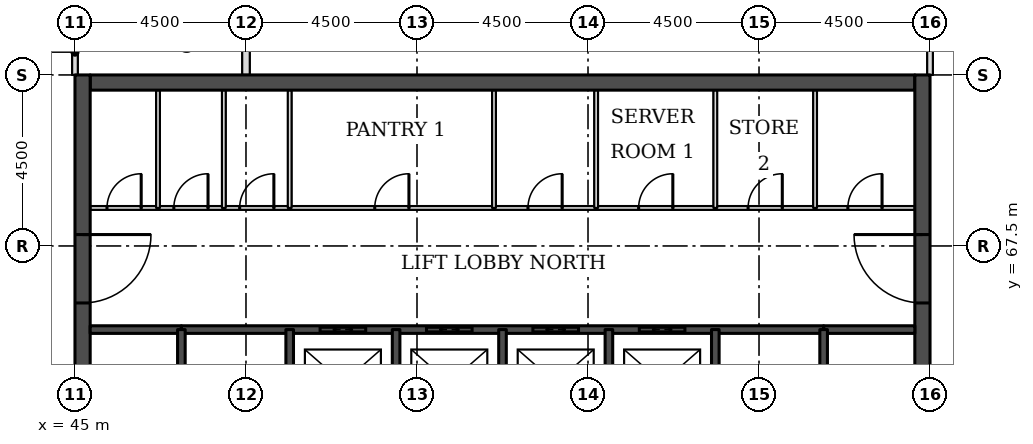
"""IFC4 building model, lengths in metres.
Left out: names, types, materials, properties, quantities, classifications, styles, units other than length and angle.
Written with IfcOpenShell. Run it as: python <this file> out.ifc"""

import sys

from ifc_helpers import new_model, si_unit, direction, frame, frame_2d, origin, place, context, subcontext, project, spatial, rectangle, extrude, element, fill, save


model = new_model("IFC4")
c1 = context("Model", 3, precision=1e-05, world=origin(), true_north=direction((0.0, 1.0)))
c2 = subcontext(c1, "Body", "Model", "MODEL_VIEW")
j1 = project(units=[si_unit("LENGTHUNIT", "METRE"), si_unit("PLANEANGLEUNIT", "RADIAN")], contexts=[c1])
p1 = place(None, origin())
s1 = spatial("IfcSite", under=j1, at=p1, CompositionType="ELEMENT")
p2 = place(p1, origin())
s2 = spatial("IfcBuilding", under=s1, at=p2, CompositionType="ELEMENT")
p3 = place(p2, frame((0.0, 0.0, 181.0)))
s3 = spatial("IfcBuildingStorey", under=s2, at=p3, CompositionType="ELEMENT", Elevation=181.0)
p4 = place(p3, frame((45.4, 71.8, 0.0), z_axis=(0.0, 0.0, 1.0), x_axis=(1.0, 0.0, 0.0)))
e1 = element("IfcWall", 1, at=p4, inside=s3, PredefinedType="SHEAR", context=c2, shape_type="SweptSolid", body=[
    extrude(rectangle(XDim=21.7, YDim=0.4, at=frame_2d((10.85, 0.0))), origin(), (0.0, 0.0, 1.0), 3.7),
])
p5 = place(p3, frame((45.2, 49.5, 0.0), z_axis=(0.0, 0.0, 1.0), x_axis=(0.0, 1.0, 0.0)))
e2 = element("IfcWall", 2, at=p5, inside=s3, PredefinedType="SHEAR", context=c2, shape_type="SweptSolid", body=[
    extrude(rectangle(XDim=22.5, YDim=0.4, at=frame_2d((11.25, 0.0))), origin(), (0.0, 0.0, 1.0), 3.7),
])
p6 = place(p5, frame((4.2, 0.0, 0.0)))
e3 = element("IfcOpeningElement", 3, at=p6, cuts=e2, PredefinedType="OPENING", context=c2, shape_type="SweptSolid", body=[
    extrude(rectangle(XDim=1.8, YDim=2.1, at=frame_2d((0.9, 1.05))), frame((0.0, 0.21, 0.0), z_axis=(0.0, -1.0, 0.0), x_axis=(1.0, 0.0, 0.0)), (0.0, 0.0, 1.0), 0.42),
])
p7 = place(p5, frame((6.9, 0.0, 0.0)))
e4 = element("IfcOpeningElement", 4, at=p7, cuts=e2, PredefinedType="OPENING", context=c2, shape_type="SweptSolid", body=[
    extrude(rectangle(XDim=1.1, YDim=2.1, at=frame_2d((0.55, 1.05))), frame((0.0, 0.21, 0.0), z_axis=(0.0, -1.0, 0.0), x_axis=(1.0, 0.0, 0.0)), (0.0, 0.0, 1.0), 0.42),
])
p8 = place(p5, frame((13.6, 0.0, 0.0)))
e5 = element("IfcOpeningElement", 5, at=p8, cuts=e2, PredefinedType="OPENING", context=c2, shape_type="SweptSolid", body=[
    extrude(rectangle(XDim=1.1, YDim=2.1, at=frame_2d((0.55, 1.05))), frame((0.0, 0.21, 0.0), z_axis=(0.0, -1.0, 0.0), x_axis=(1.0, 0.0, 0.0)), (0.0, 0.0, 1.0), 0.42),
])
p9 = place(p5, frame((16.5, 0.0, 0.0)))
e6 = element("IfcOpeningElement", 6, at=p9, cuts=e2, PredefinedType="OPENING", context=c2, shape_type="SweptSolid", body=[
    extrude(rectangle(XDim=1.8, YDim=2.1, at=frame_2d((0.9, 1.05))), frame((0.0, 0.21, 0.0), z_axis=(0.0, -1.0, 0.0), x_axis=(1.0, 0.0, 0.0)), (0.0, 0.0, 1.0), 0.42),
])
p10 = place(p3, frame((67.3, 49.5, 0.0), z_axis=(0.0, 0.0, 1.0), x_axis=(0.0, 1.0, 0.0)))
e7 = element("IfcWall", 7, at=p10, inside=s3, PredefinedType="SHEAR", context=c2, shape_type="SweptSolid", body=[
    extrude(rectangle(XDim=22.5, YDim=0.4, at=frame_2d((11.25, 0.0))), origin(), (0.0, 0.0, 1.0), 3.7),
])
p11 = place(p10, frame((4.2, 0.0, 0.0)))
e8 = element("IfcOpeningElement", 8, at=p11, cuts=e7, PredefinedType="OPENING", context=c2, shape_type="SweptSolid", body=[
    extrude(rectangle(XDim=1.8, YDim=2.1, at=frame_2d((0.9, 1.05))), frame((0.0, 0.21, 0.0), z_axis=(0.0, -1.0, 0.0), x_axis=(1.0, 0.0, 0.0)), (0.0, 0.0, 1.0), 0.42),
])
p12 = place(p10, frame((6.9, 0.0, 0.0)))
e9 = element("IfcOpeningElement", 9, at=p12, cuts=e7, PredefinedType="OPENING", context=c2, shape_type="SweptSolid", body=[
    extrude(rectangle(XDim=1.1, YDim=2.1, at=frame_2d((0.55, 1.05))), frame((0.0, 0.21, 0.0), z_axis=(0.0, -1.0, 0.0), x_axis=(1.0, 0.0, 0.0)), (0.0, 0.0, 1.0), 0.42),
])
p13 = place(p10, frame((13.6, 0.0, 0.0)))
e10 = element("IfcOpeningElement", 10, at=p13, cuts=e7, PredefinedType="OPENING", context=c2, shape_type="SweptSolid", body=[
    extrude(rectangle(XDim=1.1, YDim=2.1, at=frame_2d((0.55, 1.05))), frame((0.0, 0.21, 0.0), z_axis=(0.0, -1.0, 0.0), x_axis=(1.0, 0.0, 0.0)), (0.0, 0.0, 1.0), 0.42),
])
p14 = place(p10, frame((16.5, 0.0, 0.0)))
e11 = element("IfcOpeningElement", 11, at=p14, cuts=e7, PredefinedType="OPENING", context=c2, shape_type="SweptSolid", body=[
    extrude(rectangle(XDim=1.8, YDim=2.1, at=frame_2d((0.9, 1.05))), frame((0.0, 0.21, 0.0), z_axis=(0.0, -1.0, 0.0), x_axis=(1.0, 0.0, 0.0)), (0.0, 0.0, 1.0), 0.42),
])
p15 = place(p3, frame((45.0, 72.0, 0.0), z_axis=(0.0, 0.0, 1.0), x_axis=(0.0, 1.0, 0.0)))
e12 = element("IfcWall", 12, at=p15, inside=s3, PredefinedType="PARTITIONING", context=c2, shape_type="SweptSolid", body=[
    extrude(rectangle(XDim=6.0, YDim=0.15, at=frame_2d((3.0, 0.0))), origin(), (0.0, 0.0, 1.0), 3.022),
])
p16 = place(p15, frame((2.5, 0.0, 0.0)))
e13 = element("IfcOpeningElement", 13, at=p16, cuts=e12, PredefinedType="OPENING", context=c2, shape_type="SweptSolid", body=[
    extrude(rectangle(XDim=1.0, YDim=2.1, at=frame_2d((0.5, 1.05))), frame((0.0, 0.085, 0.0), z_axis=(0.0, -1.0, 0.0), x_axis=(1.0, 0.0, 0.0)), (0.0, 0.0, 1.0), 0.17),
])
p17 = place(p3, frame((49.5, 72.0, 0.0), z_axis=(0.0, 0.0, 1.0), x_axis=(0.0, 1.0, 0.0)))
e14 = element("IfcWall", 14, at=p17, inside=s3, PredefinedType="PARTITIONING", context=c2, shape_type="SweptSolid", body=[
    extrude(rectangle(XDim=3.0, YDim=0.2, at=frame_2d((1.5, 0.0))), origin(), (0.0, 0.0, 1.0), 3.55),
])
p18 = place(p3, frame((67.5, 72.0, 0.0), z_axis=(0.0, 0.0, 1.0), x_axis=(0.0, 1.0, 0.0)))
e15 = element("IfcWall", 15, at=p18, inside=s3, PredefinedType="PARTITIONING", context=c2, shape_type="SweptSolid", body=[
    extrude(rectangle(XDim=3.0, YDim=0.15, at=frame_2d((1.5, 0.0))), origin(), (0.0, 0.0, 1.0), 3.022),
])
p19 = place(p18, frame((1.0, 0.0, 0.0)))
e16 = element("IfcOpeningElement", 16, at=p19, cuts=e15, PredefinedType="OPENING", context=c2, shape_type="SweptSolid", body=[
    extrude(rectangle(XDim=1.0, YDim=2.1, at=frame_2d((0.5, 1.05))), frame((0.0, 0.085, 0.0), z_axis=(0.0, -1.0, 0.0), x_axis=(1.0, 0.0, 0.0)), (0.0, 0.0, 1.0), 0.17),
])
for number, where, z_axis, x_axis in (
    (17, (45.4, 65.3, 0.0), (0.0, 0.0, 1.0), (1.0, 0.0, 0.0)),
    (18, (64.7, 65.3, 0.0), (0.0, 0.0, 1.0), (1.0, 0.0, 0.0)),
):
    element("IfcWall", number, at=place(p3, frame(where, z_axis=z_axis, x_axis=x_axis)), inside=s3, PredefinedType="SOLIDWALL", context=c2, shape_type="SweptSolid", body=[
        extrude(rectangle(XDim=2.4, YDim=0.2, at=frame_2d((1.2, 0.0))), origin(), (0.0, 0.0, 1.0), 3.55),
    ])
p20 = place(p3, frame((47.8, 65.3, 0.0), z_axis=(0.0, 0.0, 1.0), x_axis=(1.0, 0.0, 0.0)))
e19 = element("IfcWall", 19, at=p20, inside=s3, PredefinedType="SOLIDWALL", context=c2, shape_type="SweptSolid", body=[
    extrude(rectangle(XDim=16.9, YDim=0.2, at=frame_2d((8.45, 0.0))), origin(), (0.0, 0.0, 1.0), 3.55),
])
p21 = place(p20, frame((3.65, 0.0, 0.0)))
e20 = element("IfcOpeningElement", 20, at=p21, cuts=e19, PredefinedType="OPENING", context=c2, shape_type="SweptSolid", body=[
    extrude(rectangle(XDim=1.2, YDim=2.1, at=frame_2d((0.6, 1.05))), frame((0.0, 0.11, 0.0), z_axis=(0.0, -1.0, 0.0), x_axis=(1.0, 0.0, 0.0)), (0.0, 0.0, 1.0), 0.22),
])
p22 = place(p20, frame((6.45, 0.0, 0.0)))
e21 = element("IfcOpeningElement", 21, at=p22, cuts=e19, PredefinedType="OPENING", context=c2, shape_type="SweptSolid", body=[
    extrude(rectangle(XDim=1.2, YDim=2.1, at=frame_2d((0.6, 1.05))), frame((0.0, 0.11, 0.0), z_axis=(0.0, -1.0, 0.0), x_axis=(1.0, 0.0, 0.0)), (0.0, 0.0, 1.0), 0.22),
])
p23 = place(p20, frame((9.25, 0.0, 0.0)))
e22 = element("IfcOpeningElement", 22, at=p23, cuts=e19, PredefinedType="OPENING", context=c2, shape_type="SweptSolid", body=[
    extrude(rectangle(XDim=1.2, YDim=2.1, at=frame_2d((0.6, 1.05))), frame((0.0, 0.11, 0.0), z_axis=(0.0, -1.0, 0.0), x_axis=(1.0, 0.0, 0.0)), (0.0, 0.0, 1.0), 0.22),
])
p24 = place(p20, frame((12.05, 0.0, 0.0)))
e23 = element("IfcOpeningElement", 23, at=p24, cuts=e19, PredefinedType="OPENING", context=c2, shape_type="SweptSolid", body=[
    extrude(rectangle(XDim=1.2, YDim=2.1, at=frame_2d((0.6, 1.05))), frame((0.0, 0.11, 0.0), z_axis=(0.0, -1.0, 0.0), x_axis=(1.0, 0.0, 0.0)), (0.0, 0.0, 1.0), 0.22),
])
p25 = place(p3, frame((45.4, 68.5, 0.0), z_axis=(0.0, 0.0, 1.0), x_axis=(1.0, 0.0, 0.0)))
e24 = element("IfcWall", 24, at=p25, inside=s3, PredefinedType="PARTITIONING", context=c2, shape_type="SweptSolid", body=[
    extrude(rectangle(XDim=21.7, YDim=0.1, at=frame_2d((10.85, 0.0))), origin(), (0.0, 0.0, 1.0), 3.55),
])
p26 = place(p25, frame((19.938, 0.0, 0.0)))
e25 = element("IfcOpeningElement", 25, at=p26, cuts=e24, PredefinedType="OPENING", context=c2, shape_type="SweptSolid", body=[
    extrude(rectangle(XDim=0.9, YDim=2.1, at=frame_2d((0.45, 1.05))), frame((0.0, 0.06, 0.0), z_axis=(0.0, -1.0, 0.0), x_axis=(1.0, 0.0, 0.0)), (0.0, 0.0, 1.0), 0.12),
])
p27 = place(p25, frame((17.312, 0.0, 0.0)))
e26 = element("IfcOpeningElement", 26, at=p27, cuts=e24, PredefinedType="OPENING", context=c2, shape_type="SweptSolid", body=[
    extrude(rectangle(XDim=0.9, YDim=2.1, at=frame_2d((0.45, 1.05))), frame((0.0, 0.06, 0.0), z_axis=(0.0, -1.0, 0.0), x_axis=(1.0, 0.0, 0.0)), (0.0, 0.0, 1.0), 0.12),
])
p28 = place(p25, frame((0.442, 0.0, 0.0)))
e27 = element("IfcOpeningElement", 27, at=p28, cuts=e24, PredefinedType="OPENING", context=c2, shape_type="SweptSolid", body=[
    extrude(rectangle(XDim=0.9, YDim=2.1, at=frame_2d((0.45, 1.05))), frame((0.0, 0.06, 0.0), z_axis=(0.0, -1.0, 0.0), x_axis=(1.0, 0.0, 0.0)), (0.0, 0.0, 1.0), 0.12),
])
p29 = place(p25, frame((2.201, 0.0, 0.0)))
e28 = element("IfcOpeningElement", 28, at=p29, cuts=e24, PredefinedType="OPENING", context=c2, shape_type="SweptSolid", body=[
    extrude(rectangle(XDim=0.9, YDim=2.1, at=frame_2d((0.45, 1.05))), frame((0.0, 0.06, 0.0), z_axis=(0.0, -1.0, 0.0), x_axis=(1.0, 0.0, 0.0)), (0.0, 0.0, 1.0), 0.12),
])
p30 = place(p25, frame((3.934, 0.0, 0.0)))
e29 = element("IfcOpeningElement", 29, at=p30, cuts=e24, PredefinedType="OPENING", context=c2, shape_type="SweptSolid", body=[
    extrude(rectangle(XDim=0.9, YDim=2.1, at=frame_2d((0.45, 1.05))), frame((0.0, 0.06, 0.0), z_axis=(0.0, -1.0, 0.0), x_axis=(1.0, 0.0, 0.0)), (0.0, 0.0, 1.0), 0.12),
])
p31 = place(p25, frame((14.432, 0.0, 0.0)))
e30 = element("IfcOpeningElement", 30, at=p31, cuts=e24, PredefinedType="OPENING", context=c2, shape_type="SweptSolid", body=[
    extrude(rectangle(XDim=0.9, YDim=2.1, at=frame_2d((0.45, 1.05))), frame((0.0, 0.06, 0.0), z_axis=(0.0, -1.0, 0.0), x_axis=(1.0, 0.0, 0.0)), (0.0, 0.0, 1.0), 0.12),
])
p32 = place(p25, frame((11.52, 0.0, 0.0)))
e31 = element("IfcOpeningElement", 31, at=p32, cuts=e24, PredefinedType="OPENING", context=c2, shape_type="SweptSolid", body=[
    extrude(rectangle(XDim=0.9, YDim=2.1, at=frame_2d((0.45, 1.05))), frame((0.0, 0.06, 0.0), z_axis=(0.0, -1.0, 0.0), x_axis=(1.0, 0.0, 0.0)), (0.0, 0.0, 1.0), 0.12),
])
p33 = place(p25, frame((7.488, 0.0, 0.0)))
e32 = element("IfcOpeningElement", 32, at=p33, cuts=e24, PredefinedType="OPENING", context=c2, shape_type="SweptSolid", body=[
    extrude(rectangle(XDim=0.9, YDim=2.1, at=frame_2d((0.45, 1.05))), frame((0.0, 0.06, 0.0), z_axis=(0.0, -1.0, 0.0), x_axis=(1.0, 0.0, 0.0)), (0.0, 0.0, 1.0), 0.12),
])
p34 = place(p3, frame((47.185, 68.5, 0.0), z_axis=(0.0, 0.0, 1.0), x_axis=(0.0, 1.0, 0.0)))
e33 = element("IfcWall", 33, at=p34, inside=s3, PredefinedType="PARTITIONING", context=c2, shape_type="SweptSolid", body=[
    extrude(rectangle(XDim=3.1, YDim=0.1, at=frame_2d((1.55, 0.0))), origin(), (0.0, 0.0, 1.0), 3.55),
])
p35 = place(p3, frame((47.8, 62.0, 0.0), z_axis=(0.0, 0.0, 1.0), x_axis=(0.0, 1.0, 0.0)))
e34 = element("IfcWall", 34, at=p35, inside=s3, PredefinedType="SOLIDWALL", context=c2, shape_type="SweptSolid", body=[
    extrude(rectangle(XDim=3.3, YDim=0.2, at=frame_2d((1.65, 0.0))), origin(), (0.0, 0.0, 1.0), 3.55),
])
p36 = place(p35, frame((1.1, 0.0, 0.0)))
e35 = element("IfcOpeningElement", 35, at=p36, cuts=e34, PredefinedType="OPENING", context=c2, shape_type="SweptSolid", body=[
    extrude(rectangle(XDim=1.1, YDim=2.1, at=frame_2d((0.55, 1.05))), frame((0.0, 0.11, 0.0), z_axis=(0.0, -1.0, 0.0), x_axis=(1.0, 0.0, 0.0)), (0.0, 0.0, 1.0), 0.22),
])
for number, where, z_axis, x_axis in (
    (36, (48.917, 68.5, 0.0), (0.0, 0.0, 1.0), (0.0, 1.0, 0.0)),
    (37, (50.65, 68.5, 0.0), (0.0, 0.0, 1.0), (0.0, 1.0, 0.0)),
):
    element("IfcWall", number, at=place(p3, frame(where, z_axis=z_axis, x_axis=x_axis)), inside=s3, PredefinedType="PARTITIONING", context=c2, shape_type="SweptSolid", body=[
        extrude(rectangle(XDim=3.1, YDim=0.1, at=frame_2d((1.55, 0.0))), origin(), (0.0, 0.0, 1.0), 3.55),
    ])
p37 = place(p3, frame((50.65, 62.0, 0.0), z_axis=(0.0, 0.0, 1.0), x_axis=(0.0, 1.0, 0.0)))
e38 = element("IfcWall", 38, at=p37, inside=s3, PredefinedType="SOLIDWALL", context=c2, shape_type="SweptSolid", body=[
    extrude(rectangle(XDim=3.3, YDim=0.2, at=frame_2d((1.65, 0.0))), origin(), (0.0, 0.0, 1.0), 3.55),
])
p38 = place(p3, frame((53.45, 62.5, 0.0), z_axis=(0.0, 0.0, 1.0), x_axis=(0.0, 1.0, 0.0)))
e39 = element("IfcWall", 39, at=p38, inside=s3, PredefinedType="SOLIDWALL", context=c2, shape_type="SweptSolid", body=[
    extrude(rectangle(XDim=2.8, YDim=0.2, at=frame_2d((1.4, 0.0))), origin(), (0.0, 0.0, 1.0), 3.55),
])
p39 = place(p3, frame((56.026, 68.5, 0.0), z_axis=(0.0, 0.0, 1.0), x_axis=(0.0, 1.0, 0.0)))
e40 = element("IfcWall", 40, at=p39, inside=s3, PredefinedType="PARTITIONING", context=c2, shape_type="SweptSolid", body=[
    extrude(rectangle(XDim=3.1, YDim=0.1, at=frame_2d((1.55, 0.0))), origin(), (0.0, 0.0, 1.0), 3.55),
])
p40 = place(p3, frame((56.25, 62.5, 0.0), z_axis=(0.0, 0.0, 1.0), x_axis=(0.0, 1.0, 0.0)))
e41 = element("IfcWall", 41, at=p40, inside=s3, PredefinedType="SOLIDWALL", context=c2, shape_type="SweptSolid", body=[
    extrude(rectangle(XDim=2.8, YDim=0.2, at=frame_2d((1.4, 0.0))), origin(), (0.0, 0.0, 1.0), 3.55),
])
p41 = place(p3, frame((58.714, 68.5, 0.0), z_axis=(0.0, 0.0, 1.0), x_axis=(0.0, 1.0, 0.0)))
e42 = element("IfcWall", 42, at=p41, inside=s3, PredefinedType="PARTITIONING", context=c2, shape_type="SweptSolid", body=[
    extrude(rectangle(XDim=3.1, YDim=0.1, at=frame_2d((1.55, 0.0))), origin(), (0.0, 0.0, 1.0), 3.55),
])
p42 = place(p3, frame((59.05, 62.5, 0.0), z_axis=(0.0, 0.0, 1.0), x_axis=(0.0, 1.0, 0.0)))
e43 = element("IfcWall", 43, at=p42, inside=s3, PredefinedType="SOLIDWALL", context=c2, shape_type="SweptSolid", body=[
    extrude(rectangle(XDim=2.8, YDim=0.2, at=frame_2d((1.4, 0.0))), origin(), (0.0, 0.0, 1.0), 3.55),
])
p43 = place(p3, frame((61.85, 68.5, 0.0), z_axis=(0.0, 0.0, 1.0), x_axis=(0.0, 1.0, 0.0)))
e44 = element("IfcWall", 44, at=p43, inside=s3, PredefinedType="PARTITIONING", context=c2, shape_type="SweptSolid", body=[
    extrude(rectangle(XDim=3.1, YDim=0.1, at=frame_2d((1.55, 0.0))), origin(), (0.0, 0.0, 1.0), 3.55),
])
p44 = place(p3, frame((61.85, 62.0, 0.0), z_axis=(0.0, 0.0, 1.0), x_axis=(0.0, 1.0, 0.0)))
e45 = element("IfcWall", 45, at=p44, inside=s3, PredefinedType="SOLIDWALL", context=c2, shape_type="SweptSolid", body=[
    extrude(rectangle(XDim=3.3, YDim=0.2, at=frame_2d((1.65, 0.0))), origin(), (0.0, 0.0, 1.0), 3.55),
])
p45 = place(p3, frame((64.475, 68.5, 0.0), z_axis=(0.0, 0.0, 1.0), x_axis=(0.0, 1.0, 0.0)))
e46 = element("IfcWall", 46, at=p45, inside=s3, PredefinedType="PARTITIONING", context=c2, shape_type="SweptSolid", body=[
    extrude(rectangle(XDim=3.1, YDim=0.1, at=frame_2d((1.55, 0.0))), origin(), (0.0, 0.0, 1.0), 3.55),
])
p46 = place(p3, frame((64.7, 62.0, 0.0), z_axis=(0.0, 0.0, 1.0), x_axis=(0.0, 1.0, 0.0)))
e47 = element("IfcWall", 47, at=p46, inside=s3, PredefinedType="SOLIDWALL", context=c2, shape_type="SweptSolid", body=[
    extrude(rectangle(XDim=3.3, YDim=0.2, at=frame_2d((1.65, 0.0))), origin(), (0.0, 0.0, 1.0), 3.55),
])
p47 = place(p46, frame((1.1, 0.0, 0.0)))
e48 = element("IfcOpeningElement", 48, at=p47, cuts=e47, PredefinedType="OPENING", context=c2, shape_type="SweptSolid", body=[
    extrude(rectangle(XDim=1.1, YDim=2.1, at=frame_2d((0.55, 1.05))), frame((0.0, 0.11, 0.0), z_axis=(0.0, -1.0, 0.0), x_axis=(1.0, 0.0, 0.0)), (0.0, 0.0, 1.0), 0.22),
])
p48 = place(p21, origin())
e49 = element("IfcDoor", 49, at=p48, inside=s3, OperationType="DOUBLE_DOOR_SLIDING", PredefinedType="DOOR", context=c2, shape_type="SweptSolid", body=[
    extrude(rectangle(XDim=1.2, YDim=2.1, at=frame_2d((0.6, 1.05))), frame((0.0, 0.025, 0.0), z_axis=(0.0, -1.0, 0.0), x_axis=(1.0, 0.0, 0.0)), (0.0, 0.0, 1.0), 0.05),
])
fill(e20, e49)
p49 = place(p22, origin())
e50 = element("IfcDoor", 50, at=p49, inside=s3, OperationType="DOUBLE_DOOR_SLIDING", PredefinedType="DOOR", context=c2, shape_type="SweptSolid", body=[
    extrude(rectangle(XDim=1.2, YDim=2.1, at=frame_2d((0.6, 1.05))), frame((0.0, 0.025, 0.0), z_axis=(0.0, -1.0, 0.0), x_axis=(1.0, 0.0, 0.0)), (0.0, 0.0, 1.0), 0.05),
])
fill(e21, e50)
p50 = place(p23, origin())
e51 = element("IfcDoor", 51, at=p50, inside=s3, OperationType="DOUBLE_DOOR_SLIDING", PredefinedType="DOOR", context=c2, shape_type="SweptSolid", body=[
    extrude(rectangle(XDim=1.2, YDim=2.1, at=frame_2d((0.6, 1.05))), frame((0.0, 0.025, 0.0), z_axis=(0.0, -1.0, 0.0), x_axis=(1.0, 0.0, 0.0)), (0.0, 0.0, 1.0), 0.05),
])
fill(e22, e51)
p51 = place(p24, origin())
e52 = element("IfcDoor", 52, at=p51, inside=s3, OperationType="DOUBLE_DOOR_SLIDING", PredefinedType="DOOR", context=c2, shape_type="SweptSolid", body=[
    extrude(rectangle(XDim=1.2, YDim=2.1, at=frame_2d((0.6, 1.05))), frame((0.0, 0.025, 0.0), z_axis=(0.0, -1.0, 0.0), x_axis=(1.0, 0.0, 0.0)), (0.0, 0.0, 1.0), 0.05),
])
fill(e23, e52)
p52 = place(p9, frame((1.8, 0.0, 0.0), z_axis=(0.0, 0.0, 1.0), x_axis=(-1.0, 0.0, 0.0)))
e53 = element("IfcDoor", 53, at=p52, inside=s3, OperationType="SINGLE_SWING_LEFT", PredefinedType="DOOR", context=c2, shape_type="SweptSolid", body=[
    extrude(rectangle(XDim=1.8, YDim=2.1, at=frame_2d((0.9, 1.05))), frame((0.0, 0.025, 0.0), z_axis=(0.0, -1.0, 0.0), x_axis=(1.0, 0.0, 0.0)), (0.0, 0.0, 1.0), 0.05),
])
fill(e6, e53)
p53 = place(p14, origin())
e54 = element("IfcDoor", 54, at=p53, inside=s3, OperationType="SINGLE_SWING_RIGHT", PredefinedType="DOOR", context=c2, shape_type="SweptSolid", body=[
    extrude(rectangle(XDim=1.8, YDim=2.1, at=frame_2d((0.9, 1.05))), frame((0.0, 0.025, 0.0), z_axis=(0.0, -1.0, 0.0), x_axis=(1.0, 0.0, 0.0)), (0.0, 0.0, 1.0), 0.05),
])
fill(e11, e54)
p54 = place(p26, origin())
e55 = element("IfcDoor", 55, at=p54, inside=s3, OperationType="SINGLE_SWING_RIGHT", PredefinedType="DOOR", context=c2, shape_type="SweptSolid", body=[
    extrude(rectangle(XDim=0.9, YDim=2.1, at=frame_2d((0.45, 1.05))), frame((0.0, 0.025, 0.0), z_axis=(0.0, -1.0, 0.0), x_axis=(1.0, 0.0, 0.0)), (0.0, 0.0, 1.0), 0.05),
])
fill(e25, e55)
p55 = place(p27, origin())
e56 = element("IfcDoor", 56, at=p55, inside=s3, OperationType="SINGLE_SWING_RIGHT", PredefinedType="DOOR", context=c2, shape_type="SweptSolid", body=[
    extrude(rectangle(XDim=0.9, YDim=2.1, at=frame_2d((0.45, 1.05))), frame((0.0, 0.025, 0.0), z_axis=(0.0, -1.0, 0.0), x_axis=(1.0, 0.0, 0.0)), (0.0, 0.0, 1.0), 0.05),
])
fill(e26, e56)
p56 = place(p28, origin())
e57 = element("IfcDoor", 57, at=p56, inside=s3, OperationType="SINGLE_SWING_RIGHT", PredefinedType="DOOR", context=c2, shape_type="SweptSolid", body=[
    extrude(rectangle(XDim=0.9, YDim=2.1, at=frame_2d((0.45, 1.05))), frame((0.0, 0.025, 0.0), z_axis=(0.0, -1.0, 0.0), x_axis=(1.0, 0.0, 0.0)), (0.0, 0.0, 1.0), 0.05),
])
fill(e27, e57)
p57 = place(p29, origin())
e58 = element("IfcDoor", 58, at=p57, inside=s3, OperationType="SINGLE_SWING_RIGHT", PredefinedType="DOOR", context=c2, shape_type="SweptSolid", body=[
    extrude(rectangle(XDim=0.9, YDim=2.1, at=frame_2d((0.45, 1.05))), frame((0.0, 0.025, 0.0), z_axis=(0.0, -1.0, 0.0), x_axis=(1.0, 0.0, 0.0)), (0.0, 0.0, 1.0), 0.05),
])
fill(e28, e58)
p58 = place(p30, origin())
e59 = element("IfcDoor", 59, at=p58, inside=s3, OperationType="SINGLE_SWING_RIGHT", PredefinedType="DOOR", context=c2, shape_type="SweptSolid", body=[
    extrude(rectangle(XDim=0.9, YDim=2.1, at=frame_2d((0.45, 1.05))), frame((0.0, 0.025, 0.0), z_axis=(0.0, -1.0, 0.0), x_axis=(1.0, 0.0, 0.0)), (0.0, 0.0, 1.0), 0.05),
])
fill(e29, e59)
p59 = place(p31, origin())
e60 = element("IfcDoor", 60, at=p59, inside=s3, OperationType="SINGLE_SWING_RIGHT", PredefinedType="DOOR", context=c2, shape_type="SweptSolid", body=[
    extrude(rectangle(XDim=0.9, YDim=2.1, at=frame_2d((0.45, 1.05))), frame((0.0, 0.025, 0.0), z_axis=(0.0, -1.0, 0.0), x_axis=(1.0, 0.0, 0.0)), (0.0, 0.0, 1.0), 0.05),
])
fill(e30, e60)
p60 = place(p32, origin())
e61 = element("IfcDoor", 61, at=p60, inside=s3, OperationType="SINGLE_SWING_RIGHT", PredefinedType="DOOR", context=c2, shape_type="SweptSolid", body=[
    extrude(rectangle(XDim=0.9, YDim=2.1, at=frame_2d((0.45, 1.05))), frame((0.0, 0.025, 0.0), z_axis=(0.0, -1.0, 0.0), x_axis=(1.0, 0.0, 0.0)), (0.0, 0.0, 1.0), 0.05),
])
fill(e31, e61)
p61 = place(p33, origin())
e62 = element("IfcDoor", 62, at=p61, inside=s3, OperationType="SINGLE_SWING_RIGHT", PredefinedType="DOOR", context=c2, shape_type="SweptSolid", body=[
    extrude(rectangle(XDim=0.9, YDim=2.1, at=frame_2d((0.45, 1.05))), frame((0.0, 0.025, 0.0), z_axis=(0.0, -1.0, 0.0), x_axis=(1.0, 0.0, 0.0)), (0.0, 0.0, 1.0), 0.05),
])
fill(e32, e62)
save(model, sys.argv[1])
